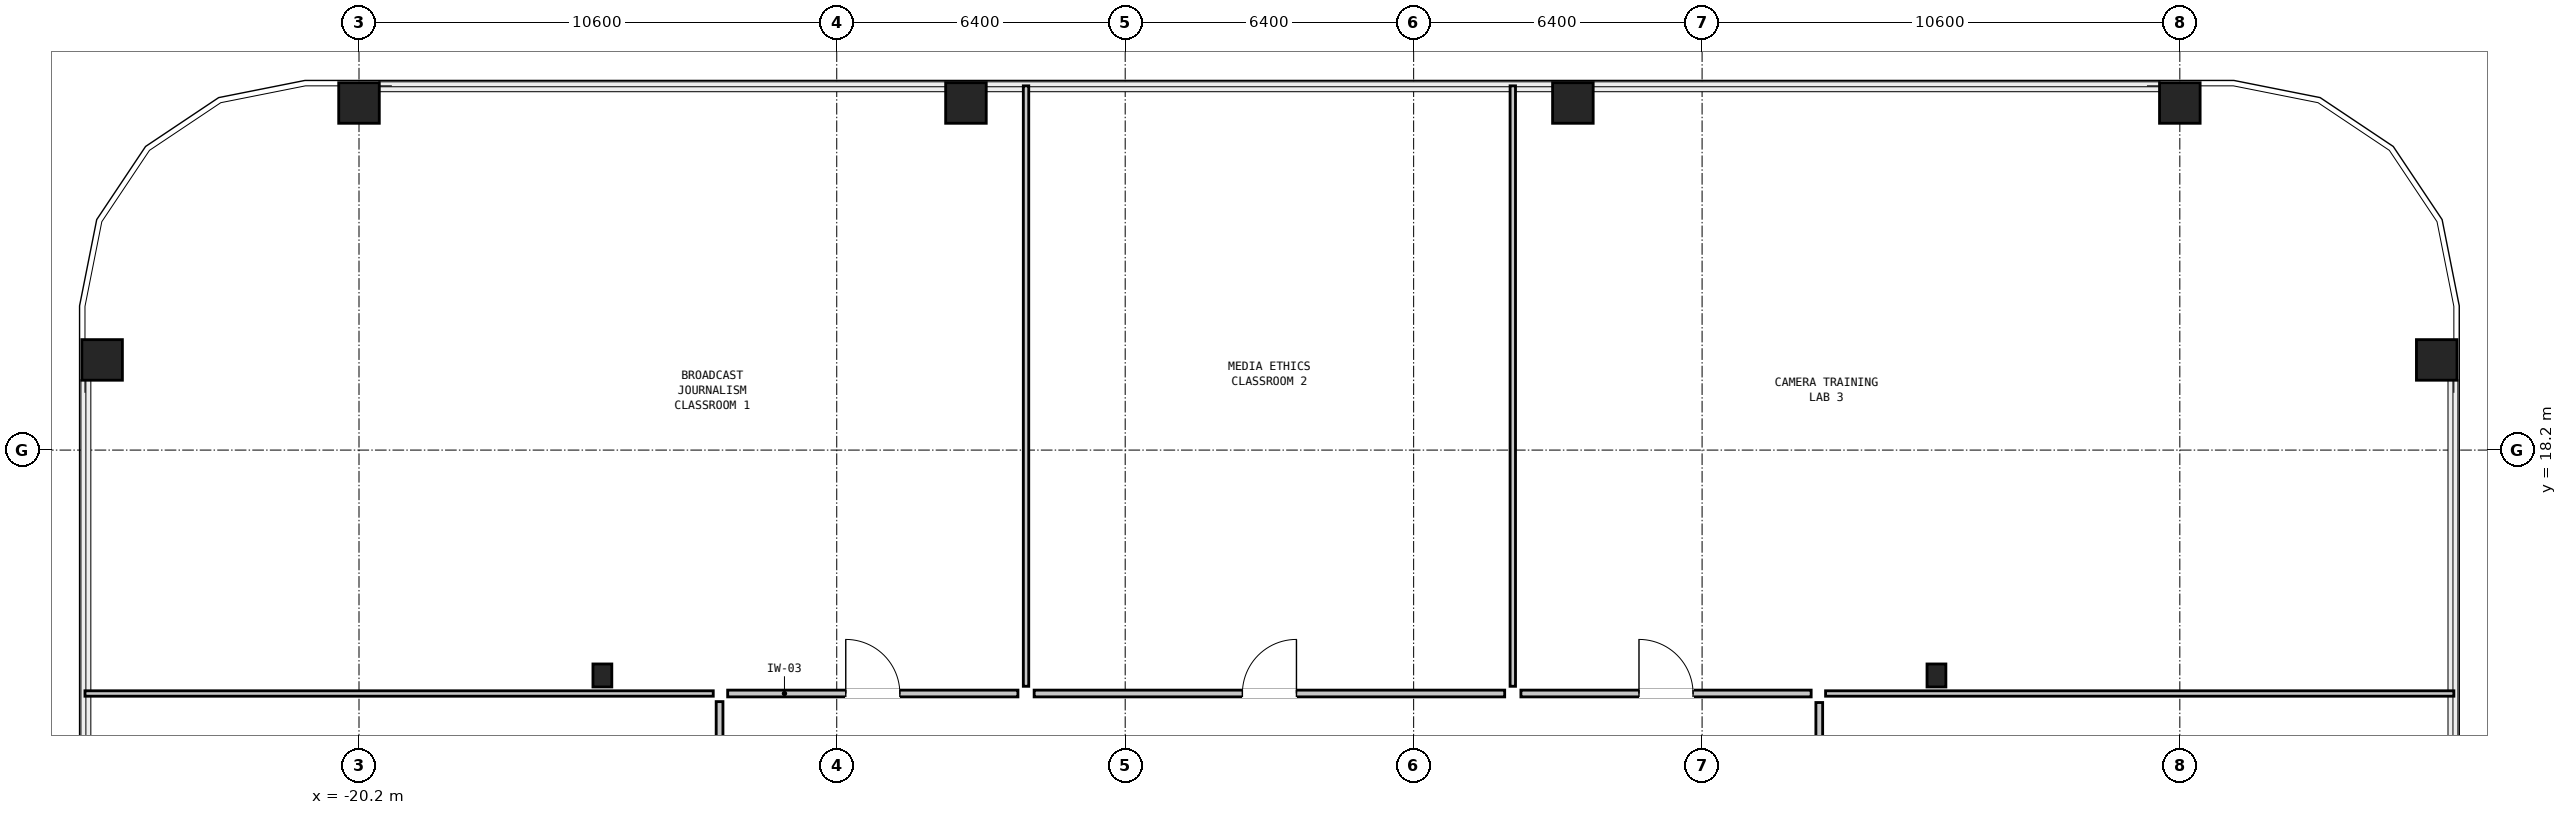
"""IFC4 building model, lengths in metres.
Left out: names, types, materials, properties, quantities, classifications, styles, units other than length and angle.
Written with IfcOpenShell. Run it as: python <this file> out.ifc"""

import sys

from ifc_helpers import new_model, si_unit, direction, frame, frame_2d, origin, origin_2d, place, context, subcontext, project, spatial, rectangle, hollow_rectangle, i_section, extrude, element, fill, save


model = new_model("IFC4")
c1 = context("Model", 3, precision=1e-05, world=origin(), true_north=direction((0.0, 1.0)))
c2 = subcontext(c1, "Body", "Model", "MODEL_VIEW")
j1 = project(units=[si_unit("LENGTHUNIT", "METRE"), si_unit("PLANEANGLEUNIT", "RADIAN")], contexts=[c1])
p1 = place(None, origin())
s1 = spatial("IfcSite", under=j1, at=p1, CompositionType="ELEMENT")
p2 = place(p1, origin())
s2 = spatial("IfcBuilding", under=s1, at=p2, CompositionType="ELEMENT")
p3 = place(p2, frame((0.0, 0.0, 53.55)))
s3 = spatial("IfcBuildingStorey", under=s2, at=p3, CompositionType="ELEMENT", Elevation=53.55)
for number, where, z_axis, x_axis in (
    (1, (25.9, 20.2, 0.0), (0.0, 0.0, 1.0), (0.0, 1.0, 0.0)),
    (2, (20.2, 25.9, 0.0), (0.0, 0.0, 1.0), (1.0, 0.0, 0.0)),
    (3, (6.733, 25.9, 0.0), (0.0, 0.0, 1.0), (1.0, 0.0, 0.0)),
    (4, (-6.733, 25.9, 0.0), (0.0, 0.0, 1.0), (1.0, 0.0, 0.0)),
    (5, (-20.2, 25.9, 0.0), (0.0, 0.0, 1.0), (1.0, 0.0, 0.0)),
    (6, (-25.9, 20.2, 0.0), (0.0, 0.0, 1.0), (0.0, 1.0, 0.0)),
):
    element("IfcColumn", number, at=place(p3, frame(where, z_axis=z_axis, x_axis=x_axis)), inside=s3, PredefinedType="COLUMN", context=c2, shape_type="SweptSolid", body=[
        extrude(hollow_rectangle(XDim=0.9, YDim=0.9, WallThickness=0.055, at=origin_2d()), origin(), (0.0, 0.0, 1.0), 4.35),
    ])
for number, where, z_axis, x_axis in (
    (7, (-14.8, 13.2, 0.0), (0.0, 0.0, 1.0), (1.0, 0.0, 0.0)),
    (8, (14.8, 13.2, 0.0), (0.0, 0.0, 1.0), (1.0, 0.0, 0.0)),
):
    element("IfcColumn", number, at=place(p3, frame(where, z_axis=z_axis, x_axis=x_axis)), inside=s3, PredefinedType="COLUMN", context=c2, shape_type="SweptSolid", body=[
        extrude(i_section(OverallWidth=0.418, OverallDepth=0.51, WebThickness=0.042, FlangeThickness=0.068, at=origin_2d()), origin(), (0.0, 0.0, 1.0), 4.35),
    ])
for number, where, z_axis, x_axis in (
    (9, (-26.28, 12.8, 0.0), (0.0, 0.0, 1.0), (1.0, 0.0, 0.0)),
    (10, (12.34, 12.8, 0.0), (0.0, 0.0, 1.0), (1.0, 0.0, 0.0)),
):
    element("IfcWall", number, at=place(p3, frame(where, z_axis=z_axis, x_axis=x_axis)), inside=s3, PredefinedType="PARTITIONING", context=c2, shape_type="SweptSolid", body=[
        extrude(rectangle(XDim=13.94, YDim=0.12, at=frame_2d((6.97, 0.0))), origin(), (0.0, 0.0, 1.0), 4.07),
    ])
for number, where, z_axis, x_axis in (
    (11, (-5.4, 12.96, 0.0), (0.0, 0.0, 1.0), (0.0, 1.0, 0.0)),
    (12, (5.4, 12.96, 0.0), (0.0, 0.0, 1.0), (0.0, 1.0, 0.0)),
):
    element("IfcWall", number, at=place(p3, frame(where, z_axis=z_axis, x_axis=x_axis)), inside=s3, PredefinedType="PARTITIONING", context=c2, shape_type="SweptSolid", body=[
        extrude(rectangle(XDim=13.32, YDim=0.12, at=frame_2d((6.66, 0.0))), origin(), (0.0, 0.0, 1.0), 4.07),
    ])
p4 = place(p3, frame((-12.02, 12.8, 0.0), z_axis=(0.0, 0.0, 1.0), x_axis=(1.0, 0.0, 0.0)))
e13 = element("IfcWall", 13, at=p4, inside=s3, PredefinedType="PARTITIONING", context=c2, shape_type="SweptSolid", body=[
    extrude(rectangle(XDim=6.44, YDim=0.15, at=frame_2d((3.22, 0.0))), origin(), (0.0, 0.0, 1.0), 4.07),
])
p5 = place(p4, frame((2.62, 0.0, 0.0)))
e14 = element("IfcOpeningElement", 14, at=p5, cuts=e13, PredefinedType="OPENING", context=c2, shape_type="SweptSolid", body=[
    extrude(rectangle(XDim=1.2, YDim=2.1, at=frame_2d((0.6, 1.05))), frame((0.0, 0.087, 0.0), z_axis=(0.0, -1.0, 0.0), x_axis=(1.0, 0.0, 0.0)), (0.0, 0.0, 1.0), 0.174),
])
p6 = place(p3, frame((-5.22, 12.8, 0.0), z_axis=(0.0, 0.0, 1.0), x_axis=(1.0, 0.0, 0.0)))
e15 = element("IfcWall", 15, at=p6, inside=s3, PredefinedType="PARTITIONING", context=c2, shape_type="SweptSolid", body=[
    extrude(rectangle(XDim=10.44, YDim=0.15, at=frame_2d((5.22, 0.0))), origin(), (0.0, 0.0, 1.0), 4.07),
])
p7 = place(p6, frame((4.62, 0.0, 0.0)))
e16 = element("IfcOpeningElement", 16, at=p7, cuts=e15, PredefinedType="OPENING", context=c2, shape_type="SweptSolid", body=[
    extrude(rectangle(XDim=1.2, YDim=2.1, at=frame_2d((0.6, 1.05))), frame((0.0, 0.087, 0.0), z_axis=(0.0, -1.0, 0.0), x_axis=(1.0, 0.0, 0.0)), (0.0, 0.0, 1.0), 0.174),
])
p8 = place(p3, frame((5.58, 12.8, 0.0), z_axis=(0.0, 0.0, 1.0), x_axis=(1.0, 0.0, 0.0)))
e17 = element("IfcWall", 17, at=p8, inside=s3, PredefinedType="PARTITIONING", context=c2, shape_type="SweptSolid", body=[
    extrude(rectangle(XDim=6.44, YDim=0.15, at=frame_2d((3.22, 0.0))), origin(), (0.0, 0.0, 1.0), 4.07),
])
p9 = place(p8, frame((2.62, 0.0, 0.0)))
e18 = element("IfcOpeningElement", 18, at=p9, cuts=e17, PredefinedType="OPENING", context=c2, shape_type="SweptSolid", body=[
    extrude(rectangle(XDim=1.2, YDim=2.1, at=frame_2d((0.6, 1.05))), frame((0.0, 0.087, 0.0), z_axis=(0.0, -1.0, 0.0), x_axis=(1.0, 0.0, 0.0)), (0.0, 0.0, 1.0), 0.174),
])
p10 = place(p3, frame((-12.2, 0.18, 0.0), z_axis=(0.0, 0.0, 1.0), x_axis=(0.0, 1.0, 0.0)))
e19 = element("IfcWall", 19, at=p10, inside=s3, PredefinedType="PARTITIONING", context=c2, shape_type="SweptSolid", body=[
    extrude(rectangle(XDim=12.44, YDim=0.15, at=frame_2d((6.22, 0.0))), origin(), (0.0, 0.0, 1.0), 4.07),
])
p11 = place(p10, frame((5.62, 0.0, 0.0)))
e20 = element("IfcOpeningElement", 20, at=p11, cuts=e19, PredefinedType="OPENING", context=c2, shape_type="SweptSolid", body=[
    extrude(rectangle(XDim=1.2, YDim=2.1, at=frame_2d((0.6, 1.05))), frame((0.0, 0.087, 0.0), z_axis=(0.0, -1.0, 0.0), x_axis=(1.0, 0.0, 0.0)), (0.0, 0.0, 1.0), 0.174),
])
p12 = place(p3, frame((12.2, 3.8, 0.0), z_axis=(0.0, 0.0, 1.0), x_axis=(0.0, 1.0, 0.0)))
e21 = element("IfcWall", 21, at=p12, inside=s3, PredefinedType="PARTITIONING", context=c2, shape_type="SweptSolid", body=[
    extrude(rectangle(XDim=8.8, YDim=0.15, at=frame_2d((4.4, 0.0))), origin(), (0.0, 0.0, 1.0), 4.07),
])
p13 = place(p12, frame((3.925, 0.0, 0.0)))
e22 = element("IfcOpeningElement", 22, at=p13, cuts=e21, PredefinedType="OPENING", context=c2, shape_type="SweptSolid", body=[
    extrude(rectangle(XDim=0.95, YDim=2.1, at=frame_2d((0.475, 1.05))), frame((0.0, 0.087, 0.0), z_axis=(0.0, -1.0, 0.0), x_axis=(1.0, 0.0, 0.0)), (0.0, 0.0, 1.0), 0.174),
])
p14 = place(p5, origin())
e23 = element("IfcDoor", 23, at=p14, inside=s3, OperationType="SINGLE_SWING_LEFT", PredefinedType="DOOR", context=c2, shape_type="SweptSolid", body=[
    extrude(rectangle(XDim=1.2, YDim=2.1, at=frame_2d((0.6, 1.05))), frame((0.0, 0.025, 0.0), z_axis=(0.0, -1.0, 0.0), x_axis=(1.0, 0.0, 0.0)), (0.0, 0.0, 1.0), 0.05),
])
fill(e14, e23)
p15 = place(p7, origin())
e24 = element("IfcDoor", 24, at=p15, inside=s3, OperationType="SINGLE_SWING_RIGHT", PredefinedType="DOOR", context=c2, shape_type="SweptSolid", body=[
    extrude(rectangle(XDim=1.2, YDim=2.1, at=frame_2d((0.6, 1.05))), frame((0.0, 0.025, 0.0), z_axis=(0.0, -1.0, 0.0), x_axis=(1.0, 0.0, 0.0)), (0.0, 0.0, 1.0), 0.05),
])
fill(e16, e24)
p16 = place(p9, origin())
e25 = element("IfcDoor", 25, at=p16, inside=s3, OperationType="SINGLE_SWING_LEFT", PredefinedType="DOOR", context=c2, shape_type="SweptSolid", body=[
    extrude(rectangle(XDim=1.2, YDim=2.1, at=frame_2d((0.6, 1.05))), frame((0.0, 0.025, 0.0), z_axis=(0.0, -1.0, 0.0), x_axis=(1.0, 0.0, 0.0)), (0.0, 0.0, 1.0), 0.05),
])
fill(e18, e25)
save(model, sys.argv[1])
